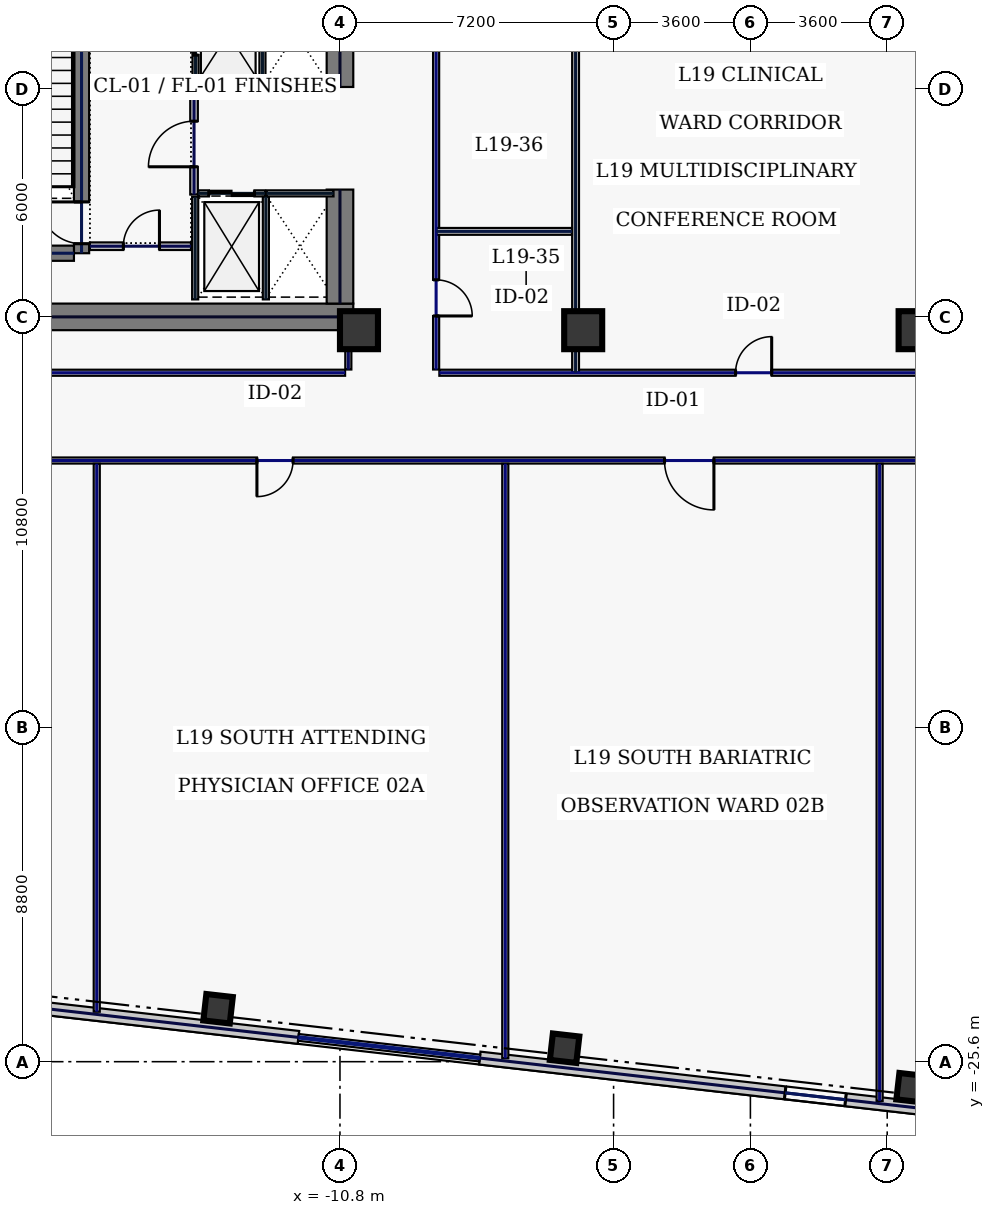
"""IFC4 building model, lengths in metres.
Left out: names, types, materials, properties, quantities, classifications, styles, units other than length and angle.
Written with IfcOpenShell. Run it as: python <this file> out.ifc"""

import sys

from ifc_helpers import new_model, si_unit, direction, frame, frame_2d, origin, origin_2d, place, context, subcontext, project, spatial, rectangle, hollow_rectangle, extrude, element, fill, save


model = new_model("IFC4")
c1 = context("Model", 3, precision=1e-05, world=origin(), true_north=direction((0.0, 1.0)))
c2 = subcontext(c1, "Body", "Model", "MODEL_VIEW")
j1 = project(units=[si_unit("LENGTHUNIT", "METRE"), si_unit("PLANEANGLEUNIT", "RADIAN")], contexts=[c1])
p1 = place(None, origin())
s1 = spatial("IfcSite", under=j1, at=p1, CompositionType="ELEMENT")
p2 = place(p1, origin())
s2 = spatial("IfcBuilding", under=s1, at=p2, CompositionType="ELEMENT")
p3 = place(p2, frame((0.0, 0.0, 89.4)))
s3 = spatial("IfcBuildingStorey", under=s2, at=p3, CompositionType="ELEMENT", Elevation=89.4)
p4 = place(p3, frame((-22.0, -6.0, 0.0), z_axis=(0.0, 0.0, 1.0), x_axis=(1.0, 0.0, 0.0)))
e1 = element("IfcWall", 1, at=p4, inside=s3, PredefinedType="SHEAR", context=c2, shape_type="SweptSolid", body=[
    extrude(rectangle(XDim=11.55, YDim=0.7, at=frame_2d((5.775, 0.0))), origin(), (0.0, 0.0, 1.0), 3.74),
])
p5 = place(p3, frame((-10.8, -5.65, 0.0), z_axis=(0.0, 0.0, 1.0), x_axis=(0.0, 1.0, 0.0)))
e2 = element("IfcWall", 2, at=p5, inside=s3, PredefinedType="SHEAR", context=c2, shape_type="SweptSolid", body=[
    extrude(rectangle(XDim=3.0, YDim=0.7, at=frame_2d((1.5, 0.0))), origin(), (0.0, 0.0, 1.0), 3.74),
])
p6 = place(p3, frame((-10.8, 0.05, 0.0), z_axis=(0.0, 0.0, 1.0), x_axis=(0.0, 1.0, 0.0)))
e3 = element("IfcWall", 3, at=p6, inside=s3, PredefinedType="SHEAR", context=c2, shape_type="SweptSolid", body=[
    extrude(rectangle(XDim=5.6, YDim=0.7, at=frame_2d((2.8, 0.0))), origin(), (0.0, 0.0, 1.0), 3.74),
])
p7 = place(p3, frame((-17.6, -4.325, 0.0), z_axis=(0.0, 0.0, 1.0), x_axis=(0.0, 1.0, 0.0)))
e4 = element("IfcWall", 4, at=p7, inside=s3, PredefinedType="SHEAR", context=c2, shape_type="SweptSolid", body=[
    extrude(rectangle(XDim=8.65, YDim=0.4, at=frame_2d((4.325, 0.0))), origin(), (0.0, 0.0, 1.0), 3.74),
])
p8 = place(p7, frame((0.25, 0.0, 0.0)))
e5 = element("IfcOpeningElement", 5, at=p8, cuts=e4, PredefinedType="OPENING", context=c2, shape_type="SweptSolid", body=[
    extrude(rectangle(XDim=1.1, YDim=2.2, at=frame_2d((0.55, 1.1))), frame((0.0, 0.21, 0.0), z_axis=(0.0, -1.0, 0.0), x_axis=(1.0, 0.0, 0.0)), (0.0, 0.0, 1.0), 0.42),
])
p9 = place(p3, frame((-21.2, -4.325, 0.0), z_axis=(0.0, 0.0, 1.0), x_axis=(1.0, 0.0, 0.0)))
e6 = element("IfcWall", 6, at=p9, inside=s3, PredefinedType="SHEAR", context=c2, shape_type="SweptSolid", body=[
    extrude(rectangle(XDim=3.4, YDim=0.4, at=frame_2d((1.7, 0.0))), origin(), (0.0, 0.0, 1.0), 3.74),
])
for number, where, z_axis, x_axis in (
    (7, (-10.3, -6.35, 0.0), (0.0, 0.0, 1.0), (1.0, 0.0, 0.0)),
    (8, (-4.4, -6.35, 0.0), (0.0, 0.0, 1.0), (1.0, 0.0, 0.0)),
    (9, (4.4, -6.35, 0.0), (0.0, 0.0, 1.0), (1.0, 0.0, 0.0)),
):
    element("IfcColumn", number, at=place(p3, frame(where, z_axis=z_axis, x_axis=x_axis)), inside=s3, PredefinedType="COLUMN", context=c2, shape_type="SweptSolid", body=[
        extrude(hollow_rectangle(XDim=1.0, YDim=1.0, WallThickness=0.045, at=origin_2d()), origin(), (0.0, 0.0, 1.0), 3.74),
    ])
for number, where, z_axis, x_axis in (
    (10, (-14.008, -24.207, 0.0), (0.0, 0.0, 1.0), (0.994, -0.113, 0.0)),
    (11, (-4.89, -25.246, 0.0), (0.0, 0.0, 1.0), (0.994, -0.113, 0.0)),
    (12, (4.229, -26.284, 0.0), (0.0, 0.0, 1.0), (0.994, -0.113, 0.0)),
):
    element("IfcColumn", number, at=place(p3, frame(where, z_axis=z_axis, x_axis=x_axis)), inside=s3, PredefinedType="COLUMN", context=c2, shape_type="SweptSolid", body=[
        extrude(hollow_rectangle(XDim=0.7, YDim=0.7, WallThickness=0.032, at=origin_2d()), origin(), (0.0, 0.0, 1.0), 3.74),
    ])
p10 = place(p3, frame((-32.977, -22.559, 0.0), z_axis=(0.0, 0.0, 1.0), x_axis=(0.993571214605, -0.113208840243, 0.0)))
e13 = element("IfcWall", 13, at=p10, inside=s3, PredefinedType="STANDARD", context=c2, shape_type="SweptSolid", body=[
    extrude(rectangle(XDim=21.223, YDim=0.34, at=frame_2d((10.611, 0.0))), origin(), (0.0, 0.0, 1.0), 3.74),
])
p11 = place(p10, frame((2.358, 0.0, 0.22)))
e14 = element("IfcOpeningElement", 14, at=p11, cuts=e13, PredefinedType="OPENING", context=c2, shape_type="SweptSolid", body=[
    extrude(rectangle(XDim=1.6, YDim=1.2, at=frame_2d((0.8, 0.6))), frame((0.0, 0.18, 0.0), z_axis=(0.0, -1.0, 0.0), x_axis=(1.0, 0.0, 0.0)), (0.0, 0.0, 1.0), 0.36),
])
p12 = place(p10, frame((6.579, 0.0, 0.22)))
e15 = element("IfcOpeningElement", 15, at=p12, cuts=e13, PredefinedType="OPENING", context=c2, shape_type="SweptSolid", body=[
    extrude(rectangle(XDim=1.6, YDim=1.2, at=frame_2d((0.8, 0.6))), frame((0.0, 0.18, 0.0), z_axis=(0.0, -1.0, 0.0), x_axis=(1.0, 0.0, 0.0)), (0.0, 0.0, 1.0), 0.36),
])
p13 = place(p10, frame((11.535, 0.0, 0.22)))
e16 = element("IfcOpeningElement", 16, at=p13, cuts=e13, PredefinedType="OPENING", context=c2, shape_type="SweptSolid", body=[
    extrude(rectangle(XDim=1.6, YDim=1.2, at=frame_2d((0.8, 0.6))), frame((0.0, 0.18, 0.0), z_axis=(0.0, -1.0, 0.0), x_axis=(1.0, 0.0, 0.0)), (0.0, 0.0, 1.0), 0.36),
])
p14 = place(p3, frame((-7.122, -25.504, 0.0), z_axis=(0.0, 0.0, 1.0), x_axis=(0.993571685551, -0.11320470693, 0.0)))
e17 = element("IfcWall", 17, at=p14, inside=s3, PredefinedType="STANDARD", context=c2, shape_type="SweptSolid", body=[
    extrude(rectangle(XDim=13.554, YDim=0.34, at=frame_2d((6.777, 0.0))), origin(), (0.0, 0.0, 1.0), 3.74),
])
p15 = place(p14, frame((8.088, 0.0, 0.22)))
e18 = element("IfcOpeningElement", 18, at=p15, cuts=e17, PredefinedType="OPENING", context=c2, shape_type="SweptSolid", body=[
    extrude(rectangle(XDim=1.6, YDim=1.2, at=frame_2d((0.8, 0.6))), frame((0.0, 0.18, 0.0), z_axis=(0.0, -1.0, 0.0), x_axis=(1.0, 0.0, 0.0)), (0.0, 0.0, 1.0), 0.36),
])
p16 = place(p3, frame((-14.6, 0.12, 0.0), z_axis=(0.0, 0.0, 1.0), x_axis=(0.0, 1.0, 0.0)))
e19 = element("IfcWall", 19, at=p16, inside=s3, PredefinedType="PARTITIONING", context=c2, shape_type="SweptSolid", body=[
    extrude(rectangle(XDim=2.74, YDim=0.16, at=frame_2d((1.37, 0.0))), origin(), (0.0, 0.0, 1.0), 3.74),
])
p17 = place(p16, frame((0.77, 0.0, 0.0)))
e20 = element("IfcOpeningElement", 20, at=p17, cuts=e19, PredefinedType="OPENING", context=c2, shape_type="SweptSolid", body=[
    extrude(rectangle(XDim=1.2, YDim=2.2, at=frame_2d((0.6, 1.1))), frame((0.0, 0.09, 0.0), z_axis=(0.0, -1.0, 0.0), x_axis=(1.0, 0.0, 0.0)), (0.0, 0.0, 1.0), 0.18),
])
p18 = place(p3, frame((-14.6, 0.1, 0.0), z_axis=(0.0, 0.0, 1.0), x_axis=(1.0, 0.0, 0.0)))
e21 = element("IfcWall", 21, at=p18, inside=s3, PredefinedType="PARTITIONING", context=c2, shape_type="SweptSolid", body=[
    extrude(rectangle(XDim=1.76, YDim=0.16, at=frame_2d((0.88, 0.0))), origin(), (0.0, 0.0, 1.0), 3.74),
])
p19 = place(p3, frame((-12.84, 0.18, 0.0), z_axis=(0.0, 0.0, 1.0), x_axis=(0.0, 1.0, 0.0)))
e22 = element("IfcWall", 22, at=p19, inside=s3, PredefinedType="PARTITIONING", context=c2, shape_type="SweptSolid", body=[
    extrude(rectangle(XDim=2.62, YDim=0.16, at=frame_2d((1.31, 0.0))), origin(), (0.0, 0.0, 1.0), 3.74),
])
p20 = place(p3, frame((-14.53, -2.75, 0.0), z_axis=(0.0, 0.0, 1.0), x_axis=(1.0, 0.0, 0.0)))
e23 = element("IfcWall", 23, at=p20, inside=s3, PredefinedType="PARTITIONING", context=c2, shape_type="SweptSolid", body=[
    extrude(rectangle(XDim=1.76, YDim=0.16, at=frame_2d((0.88, 0.0))), origin(), (0.0, 0.0, 1.0), 3.74),
])
p21 = place(p20, frame((0.28, 0.0, 0.0)))
e24 = element("IfcOpeningElement", 24, at=p21, cuts=e23, PredefinedType="OPENING", context=c2, shape_type="SweptSolid", body=[
    extrude(rectangle(XDim=1.2, YDim=2.2, at=frame_2d((0.6, 1.1))), frame((0.0, 0.09, 0.0), z_axis=(0.0, -1.0, 0.0), x_axis=(1.0, 0.0, 0.0)), (0.0, 0.0, 1.0), 0.18),
])
for number, where, z_axis, x_axis in (
    (25, (-12.75, -5.54, 0.0), (0.0, 0.0, 1.0), (0.0, 1.0, 0.0)),
    (26, (-14.61, -5.54, 0.0), (0.0, 0.0, 1.0), (0.0, 1.0, 0.0)),
):
    element("IfcWall", number, at=place(p3, frame(where, z_axis=z_axis, x_axis=x_axis)), inside=s3, PredefinedType="PARTITIONING", context=c2, shape_type="SweptSolid", body=[
        extrude(rectangle(XDim=2.7, YDim=0.16, at=frame_2d((1.35, 0.0))), origin(), (0.0, 0.0, 1.0), 3.74),
    ])
p22 = place(p3, frame((-12.73, -2.75, 0.0), z_axis=(0.0, 0.0, 1.0), x_axis=(1.0, 0.0, 0.0)))
e27 = element("IfcWall", 27, at=p22, inside=s3, PredefinedType="PARTITIONING", context=c2, shape_type="SweptSolid", body=[
    extrude(rectangle(XDim=1.76, YDim=0.16, at=frame_2d((0.88, 0.0))), origin(), (0.0, 0.0, 1.0), 3.74),
])
p23 = place(p3, frame((-12.82, 0.06, 0.0), z_axis=(0.0, 0.0, 1.0), x_axis=(1.0, 0.0, 0.0)))
e28 = element("IfcWall", 28, at=p23, inside=s3, PredefinedType="PARTITIONING", context=c2, shape_type="SweptSolid", body=[
    extrude(rectangle(XDim=1.72, YDim=0.16, at=frame_2d((0.86, 0.0))), origin(), (0.0, 0.0, 1.0), 3.74),
])
p24 = place(p3, frame((-17.38, -4.14, 0.0), z_axis=(0.0, 0.0, 1.0), x_axis=(1.0, 0.0, 0.0)))
e29 = element("IfcWall", 29, at=p24, inside=s3, PredefinedType="SOLIDWALL", context=c2, shape_type="SweptSolid", body=[
    extrude(rectangle(XDim=2.66, YDim=0.2, at=frame_2d((1.33, 0.0))), origin(), (0.0, 0.0, 1.0), 3.74),
])
p25 = place(p24, frame((0.88, 0.0, 0.0)))
e30 = element("IfcOpeningElement", 30, at=p25, cuts=e29, PredefinedType="OPENING", context=c2, shape_type="SweptSolid", body=[
    extrude(rectangle(XDim=0.95, YDim=2.2, at=frame_2d((0.475, 1.1))), frame((0.0, 0.11, 0.0), z_axis=(0.0, -1.0, 0.0), x_axis=(1.0, 0.0, 0.0)), (0.0, 0.0, 1.0), 0.22),
])
p26 = place(p3, frame((-14.64, -2.78, 0.0), z_axis=(0.0, 0.0, 1.0), x_axis=(0.0, 1.0, 0.0)))
e31 = element("IfcWall", 31, at=p26, inside=s3, PredefinedType="SOLIDWALL", context=c2, shape_type="SweptSolid", body=[
    extrude(rectangle(XDim=2.82, YDim=0.2, at=frame_2d((1.41, 0.0))), origin(), (0.0, 0.0, 1.0), 3.74),
])
p27 = place(p26, frame((0.73, 0.0, 0.0)))
e32 = element("IfcOpeningElement", 32, at=p27, cuts=e31, PredefinedType="OPENING", context=c2, shape_type="SweptSolid", body=[
    extrude(rectangle(XDim=1.2, YDim=2.2, at=frame_2d((0.6, 1.1))), frame((0.0, 0.11, 0.0), z_axis=(0.0, -1.0, 0.0), x_axis=(1.0, 0.0, 0.0)), (0.0, 0.0, 1.0), 0.22),
])
p28 = place(p3, frame((27.465, -9.78, 0.0), z_axis=(0.0, 0.0, 1.0), x_axis=(-1.0, 0.0, 0.0)))
e33 = element("IfcWall", 33, at=p28, inside=s3, PredefinedType="PARTITIONING", context=c2, shape_type="SweptSolid", body=[
    extrude(rectangle(XDim=54.93, YDim=0.16, at=frame_2d((27.465, 0.0))), origin(), (0.0, 0.0, 1.0), 3.74),
])
p29 = place(p28, frame((49.256, 0.0, 0.0)))
e34 = element("IfcOpeningElement", 34, at=p29, cuts=e33, PredefinedType="OPENING", context=c2, shape_type="SweptSolid", body=[
    extrude(rectangle(XDim=0.95, YDim=2.2, at=frame_2d((0.475, 1.1))), frame((0.0, 0.09, 0.0), z_axis=(0.0, -1.0, 0.0), x_axis=(1.0, 0.0, 0.0)), (0.0, 0.0, 1.0), 0.18),
])
p30 = place(p28, frame((39.5, 0.0, 0.0)))
e35 = element("IfcOpeningElement", 35, at=p30, cuts=e33, PredefinedType="OPENING", context=c2, shape_type="SweptSolid", body=[
    extrude(rectangle(XDim=0.95, YDim=2.2, at=frame_2d((0.475, 1.1))), frame((0.0, 0.09, 0.0), z_axis=(0.0, -1.0, 0.0), x_axis=(1.0, 0.0, 0.0)), (0.0, 0.0, 1.0), 0.18),
])
p31 = place(p28, frame((28.425, 0.0, 0.0)))
e36 = element("IfcOpeningElement", 36, at=p31, cuts=e33, PredefinedType="OPENING", context=c2, shape_type="SweptSolid", body=[
    extrude(rectangle(XDim=1.3, YDim=2.2, at=frame_2d((0.65, 1.1))), frame((0.0, 0.09, 0.0), z_axis=(0.0, -1.0, 0.0), x_axis=(1.0, 0.0, 0.0)), (0.0, 0.0, 1.0), 0.18),
])
p32 = place(p28, frame((19.475, 0.0, 0.0)))
e37 = element("IfcOpeningElement", 37, at=p32, cuts=e33, PredefinedType="OPENING", context=c2, shape_type="SweptSolid", body=[
    extrude(rectangle(XDim=1.3, YDim=2.2, at=frame_2d((0.65, 1.1))), frame((0.0, 0.09, 0.0), z_axis=(0.0, -1.0, 0.0), x_axis=(1.0, 0.0, 0.0)), (0.0, 0.0, 1.0), 0.18),
])
p33 = place(p28, frame((11.875, 0.0, 0.0)))
e38 = element("IfcOpeningElement", 38, at=p33, cuts=e33, PredefinedType="OPENING", context=c2, shape_type="SweptSolid", body=[
    extrude(rectangle(XDim=1.45, YDim=2.2, at=frame_2d((0.725, 1.1))), frame((0.0, 0.09, 0.0), z_axis=(0.0, -1.0, 0.0), x_axis=(1.0, 0.0, 0.0)), (0.0, 0.0, 1.0), 0.18),
])
p34 = place(p28, frame((6.012, 0.0, 0.0)))
e39 = element("IfcOpeningElement", 39, at=p34, cuts=e33, PredefinedType="OPENING", context=c2, shape_type="SweptSolid", body=[
    extrude(rectangle(XDim=0.95, YDim=2.2, at=frame_2d((0.475, 1.1))), frame((0.0, 0.09, 0.0), z_axis=(0.0, -1.0, 0.0), x_axis=(1.0, 0.0, 0.0)), (0.0, 0.0, 1.0), 0.18),
])
p35 = place(p28, frame((1.732, 0.0, 0.0)))
e40 = element("IfcOpeningElement", 40, at=p35, cuts=e33, PredefinedType="OPENING", context=c2, shape_type="SweptSolid", body=[
    extrude(rectangle(XDim=0.95, YDim=2.2, at=frame_2d((0.475, 1.1))), frame((0.0, 0.09, 0.0), z_axis=(0.0, -1.0, 0.0), x_axis=(1.0, 0.0, 0.0)), (0.0, 0.0, 1.0), 0.18),
])
p36 = place(p3, frame((-8.27, 7.435, 0.0), z_axis=(0.0, 0.0, 1.0), x_axis=(0.0, -1.0, 0.0)))
e41 = element("IfcWall", 41, at=p36, inside=s3, PredefinedType="PARTITIONING", context=c2, shape_type="SweptSolid", body=[
    extrude(rectangle(XDim=14.82, YDim=0.16, at=frame_2d((7.41, 0.0))), origin(), (0.0, 0.0, 1.0), 3.74),
])
p37 = place(p36, frame((12.461, 0.0, 0.0)))
e42 = element("IfcOpeningElement", 42, at=p37, cuts=e41, PredefinedType="OPENING", context=c2, shape_type="SweptSolid", body=[
    extrude(rectangle(XDim=0.95, YDim=2.2, at=frame_2d((0.475, 1.1))), frame((0.0, 0.09, 0.0), z_axis=(0.0, -1.0, 0.0), x_axis=(1.0, 0.0, 0.0)), (0.0, 0.0, 1.0), 0.18),
])
p38 = place(p36, frame((5.354, 0.0, 0.0)))
e43 = element("IfcOpeningElement", 43, at=p38, cuts=e41, PredefinedType="OPENING", context=c2, shape_type="SweptSolid", body=[
    extrude(rectangle(XDim=0.95, YDim=2.2, at=frame_2d((0.475, 1.1))), frame((0.0, 0.09, 0.0), z_axis=(0.0, -1.0, 0.0), x_axis=(1.0, 0.0, 0.0)), (0.0, 0.0, 1.0), 0.18),
])
p39 = place(p3, frame((-8.185, -7.47, 0.0), z_axis=(0.0, 0.0, 1.0), x_axis=(1.0, 0.0, 0.0)))
e44 = element("IfcWall", 44, at=p39, inside=s3, PredefinedType="PARTITIONING", context=c2, shape_type="SweptSolid", body=[
    extrude(rectangle(XDim=16.37, YDim=0.16, at=frame_2d((8.185, 0.0))), origin(), (0.0, 0.0, 1.0), 3.74),
])
p40 = place(p39, frame((7.795, 0.0, 0.0)))
e45 = element("IfcOpeningElement", 45, at=p40, cuts=e44, PredefinedType="OPENING", context=c2, shape_type="SweptSolid", body=[
    extrude(rectangle(XDim=0.95, YDim=2.2, at=frame_2d((0.475, 1.1))), frame((0.0, 0.09, 0.0), z_axis=(0.0, -1.0, 0.0), x_axis=(1.0, 0.0, 0.0)), (0.0, 0.0, 1.0), 0.18),
])
p41 = place(p39, frame((14.336, 0.0, 0.0)))
e46 = element("IfcOpeningElement", 46, at=p41, cuts=e44, PredefinedType="OPENING", context=c2, shape_type="SweptSolid", body=[
    extrude(rectangle(XDim=0.95, YDim=2.2, at=frame_2d((0.475, 1.1))), frame((0.0, 0.09, 0.0), z_axis=(0.0, -1.0, 0.0), x_axis=(1.0, 0.0, 0.0)), (0.0, 0.0, 1.0), 0.18),
])
p42 = place(p3, frame((-10.58, -7.385, 0.0), z_axis=(0.0, 0.0, 1.0), x_axis=(0.0, 1.0, 0.0)))
e47 = element("IfcWall", 47, at=p42, inside=s3, PredefinedType="PARTITIONING", context=c2, shape_type="SweptSolid", body=[
    extrude(rectangle(XDim=0.965, YDim=0.16, at=frame_2d((0.482, 0.0))), origin(), (0.0, 0.0, 1.0), 1.535),
])
p43 = place(p3, frame((-25.235, -7.47, 0.0), z_axis=(0.0, 0.0, 1.0), x_axis=(1.0, 0.0, 0.0)))
e48 = element("IfcWall", 48, at=p43, inside=s3, PredefinedType="PARTITIONING", context=c2, shape_type="SweptSolid", body=[
    extrude(rectangle(XDim=14.57, YDim=0.16, at=frame_2d((7.285, 0.0))), origin(), (0.0, 0.0, 1.0), 3.74),
])
p44 = place(p3, frame((-17.2, -24.286, 0.0), z_axis=(0.0, 0.0, 1.0), x_axis=(0.0, 1.0, 0.0)))
e49 = element("IfcWall", 49, at=p44, inside=s3, PredefinedType="PARTITIONING", context=c2, shape_type="SweptSolid", body=[
    extrude(rectangle(XDim=14.421, YDim=0.16, at=frame_2d((7.21, 0.0))), origin(), (0.0, 0.0, 1.0), 3.74),
])
p45 = place(p3, frame((3.4, -26.633, 0.0), z_axis=(0.0, 0.0, 1.0), x_axis=(0.0, 1.0, 0.0)))
e50 = element("IfcWall", 50, at=p45, inside=s3, PredefinedType="PARTITIONING", context=c2, shape_type="SweptSolid", body=[
    extrude(rectangle(XDim=16.768, YDim=0.16, at=frame_2d((8.384, 0.0))), origin(), (0.0, 0.0, 1.0), 3.74),
])
p46 = place(p3, frame((-6.45, -25.51, 0.0), z_axis=(0.0, 0.0, 1.0), x_axis=(0.0, 1.0, 0.0)))
e51 = element("IfcWall", 51, at=p46, inside=s3, PredefinedType="PARTITIONING", context=c2, shape_type="SweptSolid", body=[
    extrude(rectangle(XDim=15.646, YDim=0.16, at=frame_2d((7.823, 0.0))), origin(), (0.0, 0.0, 1.0), 3.74),
])
p47 = place(p3, frame((-4.6, -7.465, 0.0), z_axis=(0.0, 0.0, 1.0), x_axis=(0.0, 1.0, 0.0)))
e52 = element("IfcWall", 52, at=p47, inside=s3, PredefinedType="PARTITIONING", context=c2, shape_type="SweptSolid", body=[
    extrude(rectangle(XDim=14.98, YDim=0.18, at=frame_2d((7.49, 0.0))), origin(), (0.0, 0.0, 1.0), 1.535),
])
p48 = place(p3, frame((-8.265, -3.75, 0.0), z_axis=(0.0, 0.0, 1.0), x_axis=(1.0, 0.0, 0.0)))
e53 = element("IfcWall", 53, at=p48, inside=s3, PredefinedType="PARTITIONING", context=c2, shape_type="SweptSolid", body=[
    extrude(rectangle(XDim=3.57, YDim=0.18, at=frame_2d((1.785, 0.0))), origin(), (0.0, 0.0, 1.0), 3.74),
])
p49 = place(p15, origin())
e54 = element("IfcWindow", 54, at=p49, inside=s3, PartitioningType="SINGLE_PANEL", PredefinedType="WINDOW", context=c2, shape_type="SweptSolid", body=[
    extrude(rectangle(XDim=1.6, YDim=1.2, at=frame_2d((0.8, 0.6))), frame((0.0, 0.03, 0.0), z_axis=(0.0, -1.0, 0.0), x_axis=(1.0, 0.0, 0.0)), (0.0, 0.0, 1.0), 0.06),
])
fill(e18, e54)
p50 = place(p8, origin())
e55 = element("IfcDoor", 55, at=p50, inside=s3, OperationType="SINGLE_SWING_RIGHT", PredefinedType="DOOR", context=c2, shape_type="SweptSolid", body=[
    extrude(rectangle(XDim=1.1, YDim=2.2, at=frame_2d((0.55, 1.1))), frame((0.0, 0.025, 0.0), z_axis=(0.0, -1.0, 0.0), x_axis=(1.0, 0.0, 0.0)), (0.0, 0.0, 1.0), 0.05),
])
fill(e5, e55)
p51 = place(p17, origin())
e56 = element("IfcDoor", 56, at=p51, inside=s3, OperationType="SLIDING_TO_LEFT", PredefinedType="DOOR", context=c2, shape_type="SweptSolid", body=[
    extrude(rectangle(XDim=1.2, YDim=2.2, at=frame_2d((0.6, 1.1))), frame((0.0, 0.025, 0.0), z_axis=(0.0, -1.0, 0.0), x_axis=(1.0, 0.0, 0.0)), (0.0, 0.0, 1.0), 0.05),
])
fill(e20, e56)
p52 = place(p21, origin())
e57 = element("IfcDoor", 57, at=p52, inside=s3, OperationType="SLIDING_TO_LEFT", PredefinedType="DOOR", context=c2, shape_type="SweptSolid", body=[
    extrude(rectangle(XDim=1.2, YDim=2.2, at=frame_2d((0.6, 1.1))), frame((0.0, 0.025, 0.0), z_axis=(0.0, -1.0, 0.0), x_axis=(1.0, 0.0, 0.0)), (0.0, 0.0, 1.0), 0.05),
])
fill(e24, e57)
p53 = place(p25, origin())
e58 = element("IfcDoor", 58, at=p53, inside=s3, OperationType="SINGLE_SWING_RIGHT", PredefinedType="DOOR", context=c2, shape_type="SweptSolid", body=[
    extrude(rectangle(XDim=0.95, YDim=2.2, at=frame_2d((0.475, 1.1))), frame((0.0, 0.025, 0.0), z_axis=(0.0, -1.0, 0.0), x_axis=(1.0, 0.0, 0.0)), (0.0, 0.0, 1.0), 0.05),
])
fill(e30, e58)
p54 = place(p27, origin())
e59 = element("IfcDoor", 59, at=p54, inside=s3, OperationType="SINGLE_SWING_LEFT", PredefinedType="DOOR", context=c2, shape_type="SweptSolid", body=[
    extrude(rectangle(XDim=1.2, YDim=2.2, at=frame_2d((0.6, 1.1))), frame((0.0, 0.025, 0.0), z_axis=(0.0, -1.0, 0.0), x_axis=(1.0, 0.0, 0.0)), (0.0, 0.0, 1.0), 0.05),
])
fill(e32, e59)
p55 = place(p30, origin())
e60 = element("IfcDoor", 60, at=p55, inside=s3, OperationType="SINGLE_SWING_RIGHT", PredefinedType="DOOR", context=c2, shape_type="SweptSolid", body=[
    extrude(rectangle(XDim=0.95, YDim=2.2, at=frame_2d((0.475, 1.1))), frame((0.0, 0.025, 0.0), z_axis=(0.0, -1.0, 0.0), x_axis=(1.0, 0.0, 0.0)), (0.0, 0.0, 1.0), 0.05),
])
fill(e35, e60)
p56 = place(p31, origin())
e61 = element("IfcDoor", 61, at=p56, inside=s3, OperationType="SINGLE_SWING_LEFT", PredefinedType="DOOR", context=c2, shape_type="SweptSolid", body=[
    extrude(rectangle(XDim=1.3, YDim=2.2, at=frame_2d((0.65, 1.1))), frame((0.0, 0.025, 0.0), z_axis=(0.0, -1.0, 0.0), x_axis=(1.0, 0.0, 0.0)), (0.0, 0.0, 1.0), 0.05),
])
fill(e36, e61)
p57 = place(p37, origin())
e62 = element("IfcDoor", 62, at=p57, inside=s3, OperationType="SINGLE_SWING_RIGHT", PredefinedType="DOOR", context=c2, shape_type="SweptSolid", body=[
    extrude(rectangle(XDim=0.95, YDim=2.2, at=frame_2d((0.475, 1.1))), frame((0.0, 0.025, 0.0), z_axis=(0.0, -1.0, 0.0), x_axis=(1.0, 0.0, 0.0)), (0.0, 0.0, 1.0), 0.05),
])
fill(e42, e62)
p58 = place(p40, origin())
e63 = element("IfcDoor", 63, at=p58, inside=s3, OperationType="SINGLE_SWING_RIGHT", PredefinedType="DOOR", context=c2, shape_type="SweptSolid", body=[
    extrude(rectangle(XDim=0.95, YDim=2.2, at=frame_2d((0.475, 1.1))), frame((0.0, 0.025, 0.0), z_axis=(0.0, -1.0, 0.0), x_axis=(1.0, 0.0, 0.0)), (0.0, 0.0, 1.0), 0.05),
])
fill(e45, e63)
save(model, sys.argv[1])
